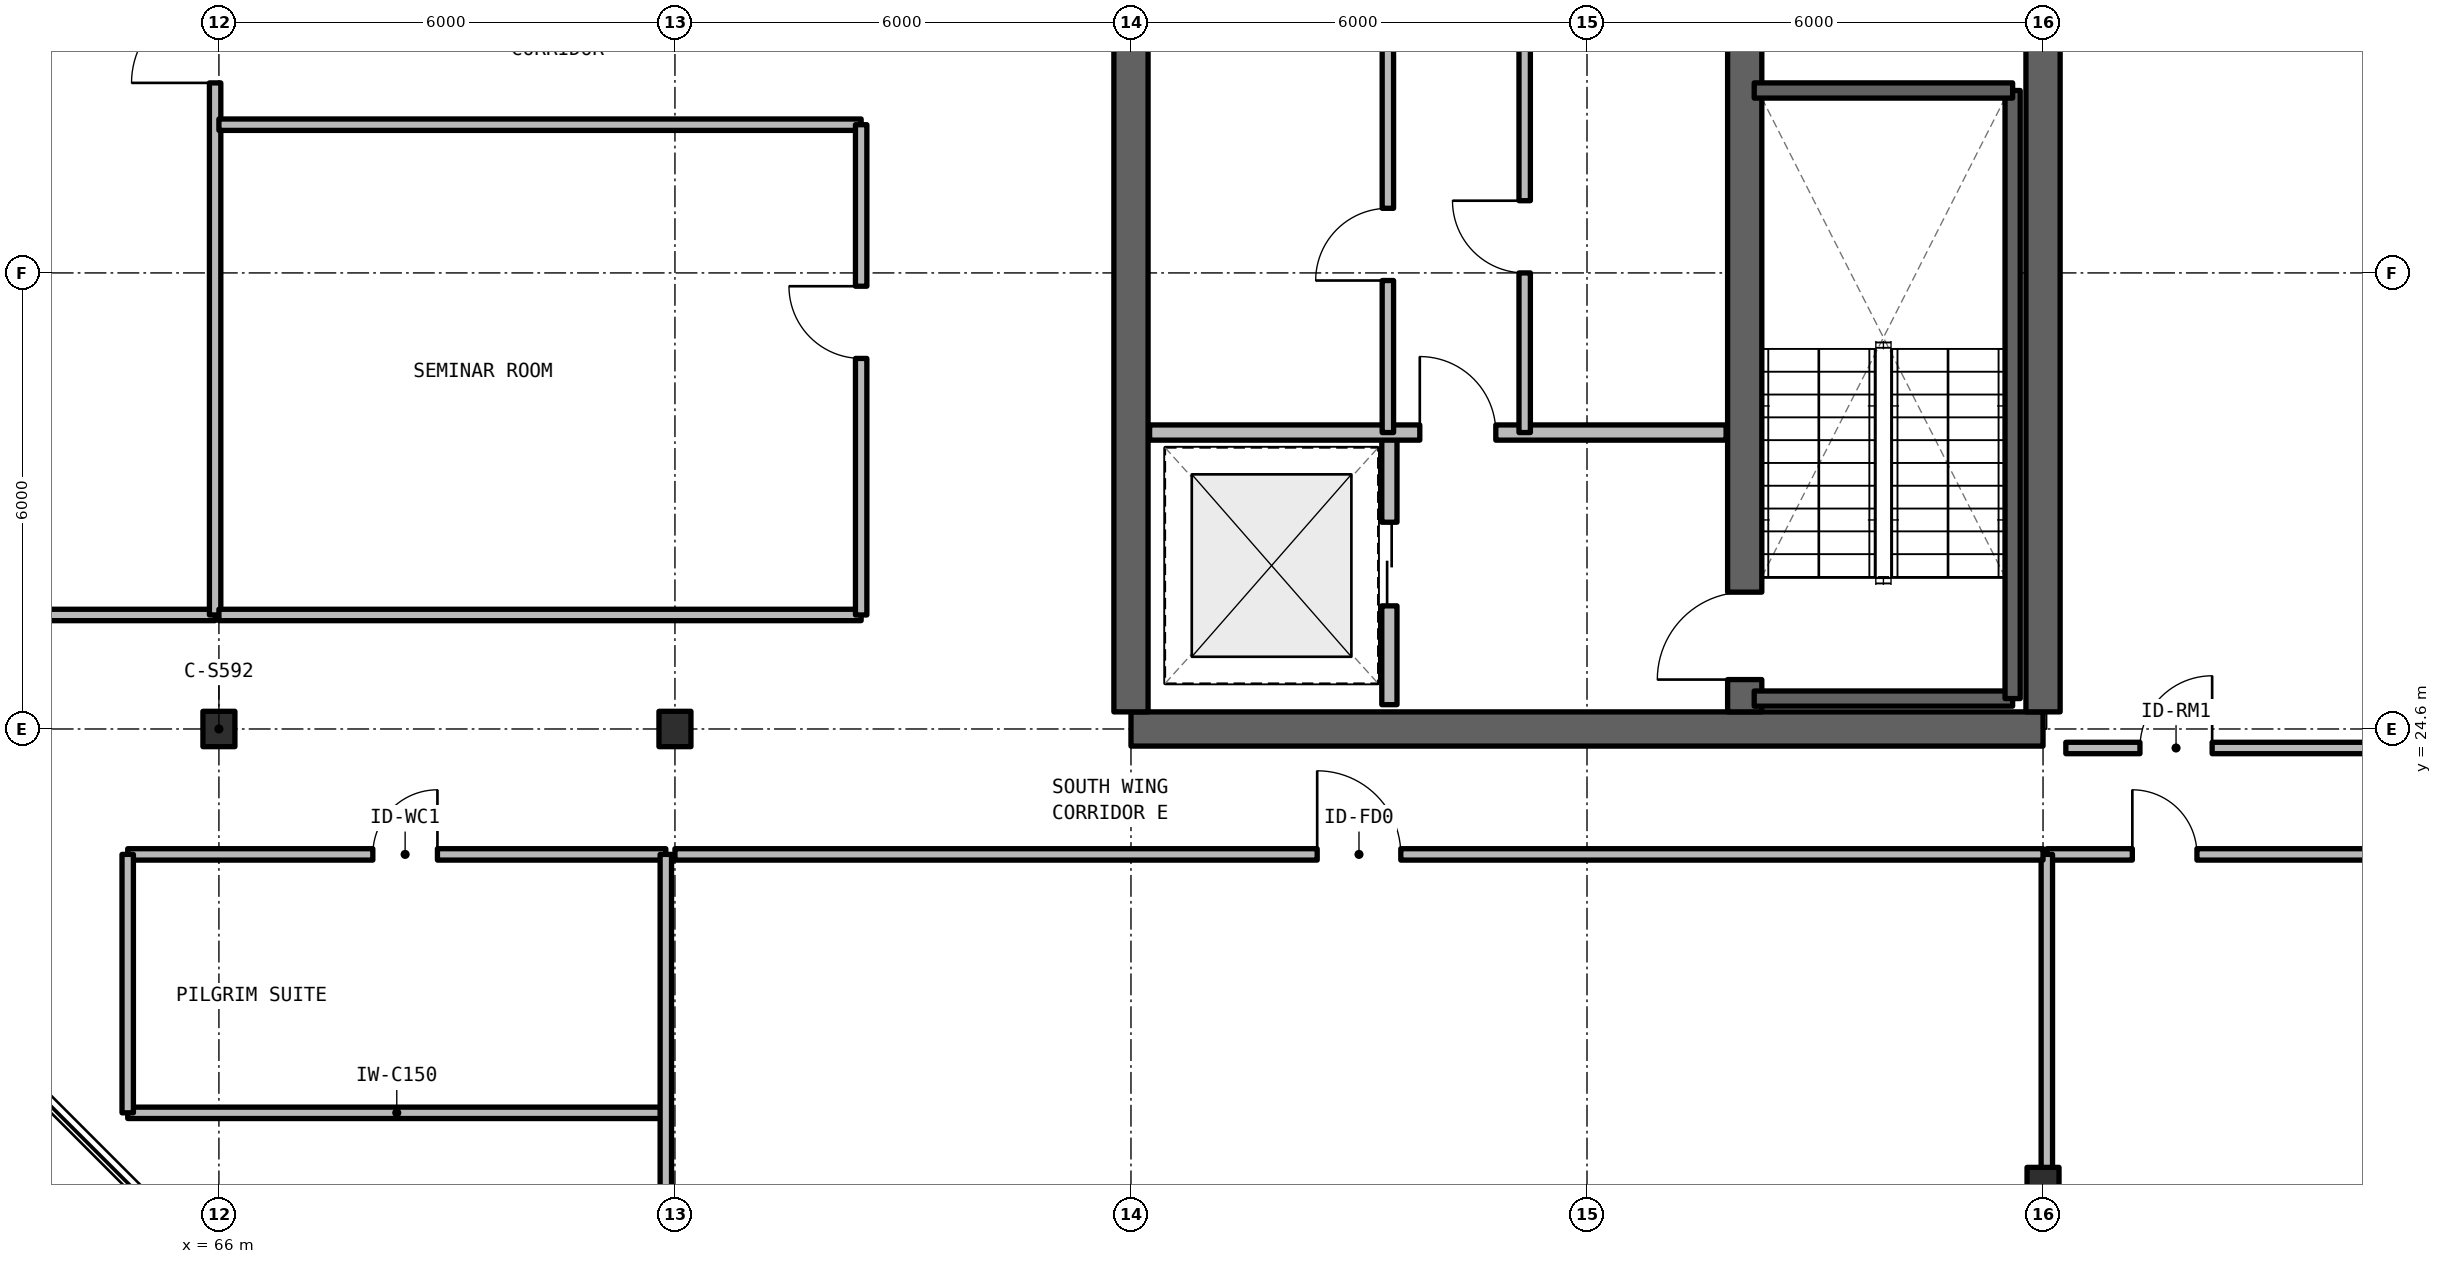
"""IFC4 building model, lengths in metres.
Left out: names, types, materials, properties, quantities, classifications, styles, units other than length and angle.
Written with IfcOpenShell. Run it as: python <this file> out.ifc"""

import sys

from ifc_helpers import new_model, si_unit, direction, frame, frame_2d, origin, origin_2d, place, context, subcontext, project, spatial, rectangle, i_section, extrude, element, fill, save


model = new_model("IFC4")
c1 = context("Model", 3, precision=1e-05, world=origin(), true_north=direction((0.0, 1.0)))
c2 = subcontext(c1, "Body", "Model", "MODEL_VIEW")
j1 = project(units=[si_unit("LENGTHUNIT", "METRE"), si_unit("PLANEANGLEUNIT", "RADIAN")], contexts=[c1])
p1 = place(None, origin())
s1 = spatial("IfcSite", under=j1, at=p1, CompositionType="ELEMENT")
p2 = place(p1, origin())
s2 = spatial("IfcBuilding", under=s1, at=p2, CompositionType="ELEMENT")
p3 = place(p2, frame((0.0, 0.0, 264.33)))
s3 = spatial("IfcBuildingStorey", under=s2, at=p3, CompositionType="ELEMENT", Elevation=264.33)
p4 = place(p3, frame((78.0, 24.6, 0.0), z_axis=(0.0, 0.0, 1.0), x_axis=(1.0, 0.0, 0.0)))
e1 = element("IfcWall", 1, at=p4, inside=s3, PredefinedType="SHEAR", context=c2, shape_type="SweptSolid", body=[
    extrude(rectangle(XDim=12.0, YDim=0.45, at=frame_2d((6.0, 0.0))), origin(), (0.0, 0.0, 1.0), 3.63),
])
p5 = place(p3, frame((90.0, 24.825, 0.0), z_axis=(0.0, 0.0, 1.0), x_axis=(0.0, 1.0, 0.0)))
e2 = element("IfcWall", 2, at=p5, inside=s3, PredefinedType="SHEAR", context=c2, shape_type="SweptSolid", body=[
    extrude(rectangle(XDim=17.55, YDim=0.45, at=frame_2d((8.775, 0.0))), origin(), (0.0, 0.0, 1.0), 3.63),
])
p6 = place(p3, frame((78.0, 24.825, 0.0), z_axis=(0.0, 0.0, 1.0), x_axis=(0.0, 1.0, 0.0)))
e3 = element("IfcWall", 3, at=p6, inside=s3, PredefinedType="SHEAR", context=c2, shape_type="SweptSolid", body=[
    extrude(rectangle(XDim=8.975, YDim=0.45, at=frame_2d((4.488, 0.0))), origin(), (0.0, 0.0, 1.0), 3.63),
])
p7 = place(p3, frame((86.075, 24.825, 0.0), z_axis=(0.0, 0.0, 1.0), x_axis=(0.0, 1.0, 0.0)))
e4 = element("IfcWall", 4, at=p7, inside=s3, PredefinedType="SHEAR", context=c2, shape_type="SweptSolid", body=[
    extrude(rectangle(XDim=17.55, YDim=0.45, at=frame_2d((8.775, 0.0))), origin(), (0.0, 0.0, 1.0), 3.63),
])
p8 = place(p7, frame((0.425, 0.0, 0.0)))
e5 = element("IfcOpeningElement", 5, at=p8, cuts=e4, PredefinedType="OPENING", context=c2, shape_type="SweptSolid", body=[
    extrude(rectangle(XDim=1.15, YDim=2.15, at=frame_2d((0.575, 1.075))), frame((0.0, 0.235, 0.0), z_axis=(0.0, -1.0, 0.0), x_axis=(1.0, 0.0, 0.0)), (0.0, 0.0, 1.0), 0.47),
])
p9 = place(p7, frame((9.625, 0.0, 0.0)))
e6 = element("IfcOpeningElement", 6, at=p9, cuts=e4, PredefinedType="OPENING", context=c2, shape_type="SweptSolid", body=[
    extrude(rectangle(XDim=1.15, YDim=2.15, at=frame_2d((0.575, 1.075))), frame((0.0, 0.235, 0.0), z_axis=(0.0, -1.0, 0.0), x_axis=(1.0, 0.0, 0.0)), (0.0, 0.0, 1.0), 0.47),
])
for number, where, z_axis, x_axis in (
    (7, (66.0, 24.6, 0.0), (0.0, 0.0, 1.0), (1.0, 0.0, 0.0)),
    (8, (72.0, 24.6, 0.0), (0.0, 0.0, 1.0), (1.0, 0.0, 0.0)),
    (9, (90.0, 18.6, 0.0), (0.0, 0.0, 1.0), (1.0, 0.0, 0.0)),
):
    element("IfcColumn", number, at=place(p3, frame(where, z_axis=z_axis, x_axis=x_axis)), inside=s3, PredefinedType="COLUMN", context=c2, shape_type="SweptSolid", body=[
        extrude(i_section(OverallWidth=0.421, OverallDepth=0.465, WebThickness=0.045, FlangeThickness=0.07, FilletRadius=0.015, at=origin_2d()), origin(), (0.0, 0.0, 1.0), 3.63),
    ])
p10 = place(p3, frame((81.4, 24.92, 0.0), z_axis=(0.0, 0.0, 1.0), x_axis=(0.0, 1.0, 0.0)))
e10 = element("IfcWall", 10, at=p10, inside=s3, PredefinedType="SOLIDWALL", context=c2, shape_type="SweptSolid", body=[
    extrude(rectangle(XDim=3.58, YDim=0.2, at=frame_2d((1.79, 0.0))), origin(), (0.0, 0.0, 1.0), 2.63),
])
p11 = place(p10, frame((1.3, 0.0, 0.0)))
e11 = element("IfcOpeningElement", 11, at=p11, cuts=e10, PredefinedType="OPENING", context=c2, shape_type="SweptSolid", body=[
    extrude(rectangle(XDim=1.1, YDim=2.2, at=frame_2d((0.55, 1.1))), frame((0.0, 0.11, 0.0), z_axis=(0.0, -1.0, 0.0), x_axis=(1.0, 0.0, 0.0)), (0.0, 0.0, 1.0), 0.22),
])
p12 = place(p3, frame((78.245, 28.5, 0.0), z_axis=(0.0, 0.0, 1.0), x_axis=(1.0, 0.0, 0.0)))
e12 = element("IfcWall", 12, at=p12, inside=s3, PredefinedType="SOLIDWALL", context=c2, shape_type="SweptSolid", body=[
    extrude(rectangle(XDim=7.585, YDim=0.2, at=frame_2d((3.792, 0.0))), origin(), (0.0, 0.0, 1.0), 2.63),
])
p13 = place(p12, frame((3.555, 0.0, 0.0)))
e13 = element("IfcOpeningElement", 13, at=p13, cuts=e12, PredefinedType="OPENING", context=c2, shape_type="SweptSolid", body=[
    extrude(rectangle(XDim=1.0, YDim=2.15, at=frame_2d((0.5, 1.075))), frame((0.0, 0.11, 0.0), z_axis=(0.0, -1.0, 0.0), x_axis=(1.0, 0.0, 0.0)), (0.0, 0.0, 1.0), 0.22),
])
p14 = place(p3, frame((83.18, 28.5, 0.0), z_axis=(0.0, 0.0, 1.0), x_axis=(0.0, 1.0, 0.0)))
e14 = element("IfcWall", 14, at=p14, inside=s3, PredefinedType="SOLIDWALL", context=c2, shape_type="SweptSolid", body=[
    extrude(rectangle(XDim=5.22, YDim=0.15, at=frame_2d((2.61, 0.0))), origin(), (0.0, 0.0, 1.0), 2.63),
])
p15 = place(p14, frame((2.1, 0.0, 0.0)))
e15 = element("IfcOpeningElement", 15, at=p15, cuts=e14, PredefinedType="OPENING", context=c2, shape_type="SweptSolid", body=[
    extrude(rectangle(XDim=0.95, YDim=2.15, at=frame_2d((0.475, 1.075))), frame((0.0, 0.085, 0.0), z_axis=(0.0, -1.0, 0.0), x_axis=(1.0, 0.0, 0.0)), (0.0, 0.0, 1.0), 0.17),
])
p16 = place(p3, frame((81.38, 28.5, 0.0), z_axis=(0.0, 0.0, 1.0), x_axis=(0.0, 1.0, 0.0)))
e16 = element("IfcWall", 16, at=p16, inside=s3, PredefinedType="SOLIDWALL", context=c2, shape_type="SweptSolid", body=[
    extrude(rectangle(XDim=5.22, YDim=0.15, at=frame_2d((2.61, 0.0))), origin(), (0.0, 0.0, 1.0), 2.63),
])
p17 = place(p16, frame((2.0, 0.0, 0.0)))
e17 = element("IfcOpeningElement", 17, at=p17, cuts=e16, PredefinedType="OPENING", context=c2, shape_type="SweptSolid", body=[
    extrude(rectangle(XDim=0.95, YDim=2.15, at=frame_2d((0.475, 1.075))), frame((0.0, 0.085, 0.0), z_axis=(0.0, -1.0, 0.0), x_axis=(1.0, 0.0, 0.0)), (0.0, 0.0, 1.0), 0.17),
])
p18 = place(p3, frame((64.8, 19.55, 0.0), z_axis=(0.0, 0.0, 1.0), x_axis=(1.0, 0.0, 0.0)))
e18 = element("IfcWall", 18, at=p18, inside=s3, PredefinedType="SOLIDWALL", context=c2, shape_type="SweptSolid", body=[
    extrude(rectangle(XDim=7.08, YDim=0.15, at=frame_2d((3.54, 0.0))), origin(), (0.0, 0.0, 1.0), 2.63),
])
p19 = place(p3, frame((64.8, 22.95, 0.0), z_axis=(0.0, 0.0, 1.0), x_axis=(1.0, 0.0, 0.0)))
e19 = element("IfcWall", 19, at=p19, inside=s3, PredefinedType="SOLIDWALL", context=c2, shape_type="SweptSolid", body=[
    extrude(rectangle(XDim=7.08, YDim=0.15, at=frame_2d((3.54, 0.0))), origin(), (0.0, 0.0, 1.0), 2.63),
])
p20 = place(p19, frame((3.225, 0.0, 0.0)))
e20 = element("IfcOpeningElement", 20, at=p20, cuts=e19, PredefinedType="OPENING", context=c2, shape_type="SweptSolid", body=[
    extrude(rectangle(XDim=0.85, YDim=2.1, at=frame_2d((0.425, 1.05))), frame((0.0, 0.085, 0.0), z_axis=(0.0, -1.0, 0.0), x_axis=(1.0, 0.0, 0.0)), (0.0, 0.0, 1.0), 0.17),
])
p21 = place(p3, frame((64.8, 19.55, 0.0), z_axis=(0.0, 0.0, 1.0), x_axis=(0.0, 1.0, 0.0)))
e21 = element("IfcWall", 21, at=p21, inside=s3, PredefinedType="SOLIDWALL", context=c2, shape_type="SweptSolid", body=[
    extrude(rectangle(XDim=3.4, YDim=0.15, at=frame_2d((1.7, 0.0))), origin(), (0.0, 0.0, 1.0), 2.63),
])
p22 = place(p3, frame((71.88, 12.34, 0.0), z_axis=(0.0, 0.0, 1.0), x_axis=(0.0, 1.0, 0.0)))
e22 = element("IfcWall", 22, at=p22, inside=s3, PredefinedType="SOLIDWALL", context=c2, shape_type="SweptSolid", body=[
    extrude(rectangle(XDim=10.61, YDim=0.15, at=frame_2d((5.305, 0.0))), origin(), (0.0, 0.0, 1.0), 2.63),
])
p23 = place(p3, frame((90.3, 24.35, 0.0), z_axis=(0.0, 0.0, 1.0), x_axis=(1.0, 0.0, 0.0)))
e23 = element("IfcWall", 23, at=p23, inside=s3, PredefinedType="SOLIDWALL", context=c2, shape_type="SweptSolid", body=[
    extrude(rectangle(XDim=8.52, YDim=0.15, at=frame_2d((4.26, 0.0))), origin(), (0.0, 0.0, 1.0), 2.63),
])
p24 = place(p23, frame((0.975, 0.0, 0.0)))
e24 = element("IfcOpeningElement", 24, at=p24, cuts=e23, PredefinedType="OPENING", context=c2, shape_type="SweptSolid", body=[
    extrude(rectangle(XDim=0.95, YDim=2.15, at=frame_2d((0.475, 1.075))), frame((0.0, 0.085, 0.0), z_axis=(0.0, -1.0, 0.0), x_axis=(1.0, 0.0, 0.0)), (0.0, 0.0, 1.0), 0.17),
])
p25 = place(p3, frame((90.05, 22.95, 0.0), z_axis=(0.0, 0.0, 1.0), x_axis=(1.0, 0.0, 0.0)))
e25 = element("IfcWall", 25, at=p25, inside=s3, PredefinedType="SOLIDWALL", context=c2, shape_type="SweptSolid", body=[
    extrude(rectangle(XDim=5.37, YDim=0.15, at=frame_2d((2.685, 0.0))), origin(), (0.0, 0.0, 1.0), 2.63),
])
p26 = place(p25, frame((1.125, 0.0, 0.0)))
e26 = element("IfcOpeningElement", 26, at=p26, cuts=e25, PredefinedType="OPENING", context=c2, shape_type="SweptSolid", body=[
    extrude(rectangle(XDim=0.85, YDim=2.1, at=frame_2d((0.425, 1.05))), frame((0.0, 0.085, 0.0), z_axis=(0.0, -1.0, 0.0), x_axis=(1.0, 0.0, 0.0)), (0.0, 0.0, 1.0), 0.17),
])
p27 = place(p3, frame((90.05, 12.34, 0.0), z_axis=(0.0, 0.0, 1.0), x_axis=(0.0, 1.0, 0.0)))
e27 = element("IfcWall", 27, at=p27, inside=s3, PredefinedType="SOLIDWALL", context=c2, shape_type="SweptSolid", body=[
    extrude(rectangle(XDim=10.61, YDim=0.15, at=frame_2d((5.305, 0.0))), origin(), (0.0, 0.0, 1.0), 2.63),
])
p28 = place(p3, frame((72.0, 22.95, 0.0), z_axis=(0.0, 0.0, 1.0), x_axis=(1.0, 0.0, 0.0)))
e28 = element("IfcWall", 28, at=p28, inside=s3, PredefinedType="SOLIDWALL", context=c2, shape_type="SweptSolid", body=[
    extrude(rectangle(XDim=18.0, YDim=0.15, at=frame_2d((9.0, 0.0))), origin(), (0.0, 0.0, 1.0), 2.63),
])
p29 = place(p28, frame((8.45, 0.0, 0.0)))
e29 = element("IfcOpeningElement", 29, at=p29, cuts=e28, PredefinedType="OPENING", context=c2, shape_type="SweptSolid", body=[
    extrude(rectangle(XDim=1.1, YDim=2.15, at=frame_2d((0.55, 1.075))), frame((0.0, 0.085, 0.0), z_axis=(0.0, -1.0, 0.0), x_axis=(1.0, 0.0, 0.0)), (0.0, 0.0, 1.0), 0.17),
])
p30 = place(p3, frame((60.2, 26.1, 0.0), z_axis=(0.0, 0.0, 1.0), x_axis=(1.0, 0.0, 0.0)))
e30 = element("IfcWall", 30, at=p30, inside=s3, PredefinedType="SOLIDWALL", context=c2, shape_type="SweptSolid", body=[
    extrude(rectangle(XDim=5.75, YDim=0.15, at=frame_2d((2.875, 0.0))), origin(), (0.0, 0.0, 1.0), 2.63),
])
p31 = place(p3, frame((65.95, 26.1, 0.0), z_axis=(0.0, 0.0, 1.0), x_axis=(0.0, 1.0, 0.0)))
e31 = element("IfcWall", 31, at=p31, inside=s3, PredefinedType="SOLIDWALL", context=c2, shape_type="SweptSolid", body=[
    extrude(rectangle(XDim=15.0, YDim=0.15, at=frame_2d((7.5, 0.0))), origin(), (0.0, 0.0, 1.0), 2.63),
])
p32 = place(p31, frame((7.0, 0.0, 0.0)))
e32 = element("IfcOpeningElement", 32, at=p32, cuts=e31, PredefinedType="OPENING", context=c2, shape_type="SweptSolid", body=[
    extrude(rectangle(XDim=1.1, YDim=2.15, at=frame_2d((0.55, 1.075))), frame((0.0, 0.085, 0.0), z_axis=(0.0, -1.0, 0.0), x_axis=(1.0, 0.0, 0.0)), (0.0, 0.0, 1.0), 0.17),
])
for number, where, z_axis, x_axis in (
    (33, (66.0, 26.1, 0.0), (0.0, 0.0, 1.0), (1.0, 0.0, 0.0)),
    (34, (66.0, 32.55, 0.0), (0.0, 0.0, 1.0), (1.0, 0.0, 0.0)),
):
    element("IfcWall", number, at=place(p3, frame(where, z_axis=z_axis, x_axis=x_axis)), inside=s3, PredefinedType="SOLIDWALL", context=c2, shape_type="SweptSolid", body=[
        extrude(rectangle(XDim=8.45, YDim=0.15, at=frame_2d((4.225, 0.0))), origin(), (0.0, 0.0, 1.0), 2.63),
    ])
p33 = place(p3, frame((74.45, 26.1, 0.0), z_axis=(0.0, 0.0, 1.0), x_axis=(0.0, 1.0, 0.0)))
e35 = element("IfcWall", 35, at=p33, inside=s3, PredefinedType="SOLIDWALL", context=c2, shape_type="SweptSolid", body=[
    extrude(rectangle(XDim=6.45, YDim=0.15, at=frame_2d((3.225, 0.0))), origin(), (0.0, 0.0, 1.0), 2.63),
])
p34 = place(p33, frame((3.375, 0.0, 0.0)))
e36 = element("IfcOpeningElement", 36, at=p34, cuts=e35, PredefinedType="OPENING", context=c2, shape_type="SweptSolid", body=[
    extrude(rectangle(XDim=0.95, YDim=2.15, at=frame_2d((0.475, 1.075))), frame((0.0, 0.085, 0.0), z_axis=(0.0, -1.0, 0.0), x_axis=(1.0, 0.0, 0.0)), (0.0, 0.0, 1.0), 0.17),
])
p35 = place(p3, frame((86.2, 25.0, 0.0), z_axis=(0.0, 0.0, 1.0), x_axis=(1.0, 0.0, 0.0)))
e37 = element("IfcWall", 37, at=p35, inside=s3, PredefinedType="SOLIDWALL", context=c2, shape_type="SweptSolid", body=[
    extrude(rectangle(XDim=3.4, YDim=0.2, at=frame_2d((1.7, 0.0))), origin(), (0.0, 0.0, 1.0), 3.63),
])
p36 = place(p3, frame((89.6, 25.0, 0.0), z_axis=(0.0, 0.0, 1.0), x_axis=(0.0, 1.0, 0.0)))
e38 = element("IfcWall", 38, at=p36, inside=s3, PredefinedType="SOLIDWALL", context=c2, shape_type="SweptSolid", body=[
    extrude(rectangle(XDim=8.0, YDim=0.2, at=frame_2d((4.0, 0.0))), origin(), (0.0, 0.0, 1.0), 3.63),
])
p37 = place(p3, frame((89.6, 33.0, 0.0), z_axis=(0.0, 0.0, 1.0), x_axis=(-1.0, 0.0, 0.0)))
e39 = element("IfcWall", 39, at=p37, inside=s3, PredefinedType="SOLIDWALL", context=c2, shape_type="SweptSolid", body=[
    extrude(rectangle(XDim=3.4, YDim=0.2, at=frame_2d((1.7, 0.0))), origin(), (0.0, 0.0, 1.0), 3.63),
])
p38 = place(p11, origin())
e40 = element("IfcDoor", 40, at=p38, inside=s3, OperationType="SLIDING_TO_LEFT", PredefinedType="DOOR", context=c2, shape_type="SweptSolid", body=[
    extrude(rectangle(XDim=1.1, YDim=2.2, at=frame_2d((0.55, 1.1))), frame((0.0, 0.025, 0.0), z_axis=(0.0, -1.0, 0.0), x_axis=(1.0, 0.0, 0.0)), (0.0, 0.0, 1.0), 0.05),
])
fill(e11, e40)
p39 = place(p13, origin())
e41 = element("IfcDoor", 41, at=p39, inside=s3, OperationType="SINGLE_SWING_LEFT", PredefinedType="DOOR", context=c2, shape_type="SweptSolid", body=[
    extrude(rectangle(XDim=1.0, YDim=2.15, at=frame_2d((0.5, 1.075))), frame((0.0, 0.025, 0.0), z_axis=(0.0, -1.0, 0.0), x_axis=(1.0, 0.0, 0.0)), (0.0, 0.0, 1.0), 0.05),
])
fill(e13, e41)
p40 = place(p15, origin())
e42 = element("IfcDoor", 42, at=p40, inside=s3, OperationType="SINGLE_SWING_RIGHT", PredefinedType="DOOR", context=c2, shape_type="SweptSolid", body=[
    extrude(rectangle(XDim=0.95, YDim=2.15, at=frame_2d((0.475, 1.075))), frame((0.0, 0.025, 0.0), z_axis=(0.0, -1.0, 0.0), x_axis=(1.0, 0.0, 0.0)), (0.0, 0.0, 1.0), 0.05),
])
fill(e15, e42)
p41 = place(p17, origin())
e43 = element("IfcDoor", 43, at=p41, inside=s3, OperationType="SINGLE_SWING_LEFT", PredefinedType="DOOR", context=c2, shape_type="SweptSolid", body=[
    extrude(rectangle(XDim=0.95, YDim=2.15, at=frame_2d((0.475, 1.075))), frame((0.0, 0.025, 0.0), z_axis=(0.0, -1.0, 0.0), x_axis=(1.0, 0.0, 0.0)), (0.0, 0.0, 1.0), 0.05),
])
fill(e17, e43)
p42 = place(p20, origin())
e44 = element("IfcDoor", 44, at=p42, inside=s3, OperationType="SINGLE_SWING_RIGHT", PredefinedType="DOOR", context=c2, shape_type="SweptSolid", body=[
    extrude(rectangle(XDim=0.85, YDim=2.1, at=frame_2d((0.425, 1.05))), frame((0.0, 0.025, 0.0), z_axis=(0.0, -1.0, 0.0), x_axis=(1.0, 0.0, 0.0)), (0.0, 0.0, 1.0), 0.05),
])
fill(e20, e44)
p43 = place(p24, origin())
e45 = element("IfcDoor", 45, at=p43, inside=s3, OperationType="SINGLE_SWING_RIGHT", PredefinedType="DOOR", context=c2, shape_type="SweptSolid", body=[
    extrude(rectangle(XDim=0.95, YDim=2.15, at=frame_2d((0.475, 1.075))), frame((0.0, 0.025, 0.0), z_axis=(0.0, -1.0, 0.0), x_axis=(1.0, 0.0, 0.0)), (0.0, 0.0, 1.0), 0.05),
])
fill(e24, e45)
p44 = place(p26, origin())
e46 = element("IfcDoor", 46, at=p44, inside=s3, OperationType="SINGLE_SWING_LEFT", PredefinedType="DOOR", context=c2, shape_type="SweptSolid", body=[
    extrude(rectangle(XDim=0.85, YDim=2.1, at=frame_2d((0.425, 1.05))), frame((0.0, 0.025, 0.0), z_axis=(0.0, -1.0, 0.0), x_axis=(1.0, 0.0, 0.0)), (0.0, 0.0, 1.0), 0.05),
])
fill(e26, e46)
p45 = place(p29, origin())
e47 = element("IfcDoor", 47, at=p45, inside=s3, OperationType="SINGLE_SWING_LEFT", PredefinedType="DOOR", context=c2, shape_type="SweptSolid", body=[
    extrude(rectangle(XDim=1.1, YDim=2.15, at=frame_2d((0.55, 1.075))), frame((0.0, 0.025, 0.0), z_axis=(0.0, -1.0, 0.0), x_axis=(1.0, 0.0, 0.0)), (0.0, 0.0, 1.0), 0.05),
])
fill(e29, e47)
p46 = place(p32, origin())
e48 = element("IfcDoor", 48, at=p46, inside=s3, OperationType="SINGLE_SWING_LEFT", PredefinedType="DOOR", context=c2, shape_type="SweptSolid", body=[
    extrude(rectangle(XDim=1.1, YDim=2.15, at=frame_2d((0.55, 1.075))), frame((0.0, 0.025, 0.0), z_axis=(0.0, -1.0, 0.0), x_axis=(1.0, 0.0, 0.0)), (0.0, 0.0, 1.0), 0.05),
])
fill(e32, e48)
p47 = place(p34, origin())
e49 = element("IfcDoor", 49, at=p47, inside=s3, OperationType="SINGLE_SWING_RIGHT", PredefinedType="DOOR", context=c2, shape_type="SweptSolid", body=[
    extrude(rectangle(XDim=0.95, YDim=2.15, at=frame_2d((0.475, 1.075))), frame((0.0, 0.025, 0.0), z_axis=(0.0, -1.0, 0.0), x_axis=(1.0, 0.0, 0.0)), (0.0, 0.0, 1.0), 0.05),
])
fill(e36, e49)
p48 = place(p8, origin())
e50 = element("IfcDoor", 50, at=p48, inside=s3, OperationType="SINGLE_SWING_RIGHT", PredefinedType="DOOR", context=c2, shape_type="SweptSolid", body=[
    extrude(rectangle(XDim=1.15, YDim=2.15, at=frame_2d((0.575, 1.075))), frame((0.0, 0.025, 0.0), z_axis=(0.0, -1.0, 0.0), x_axis=(1.0, 0.0, 0.0)), (0.0, 0.0, 1.0), 0.05),
])
fill(e5, e50)
save(model, sys.argv[1])
